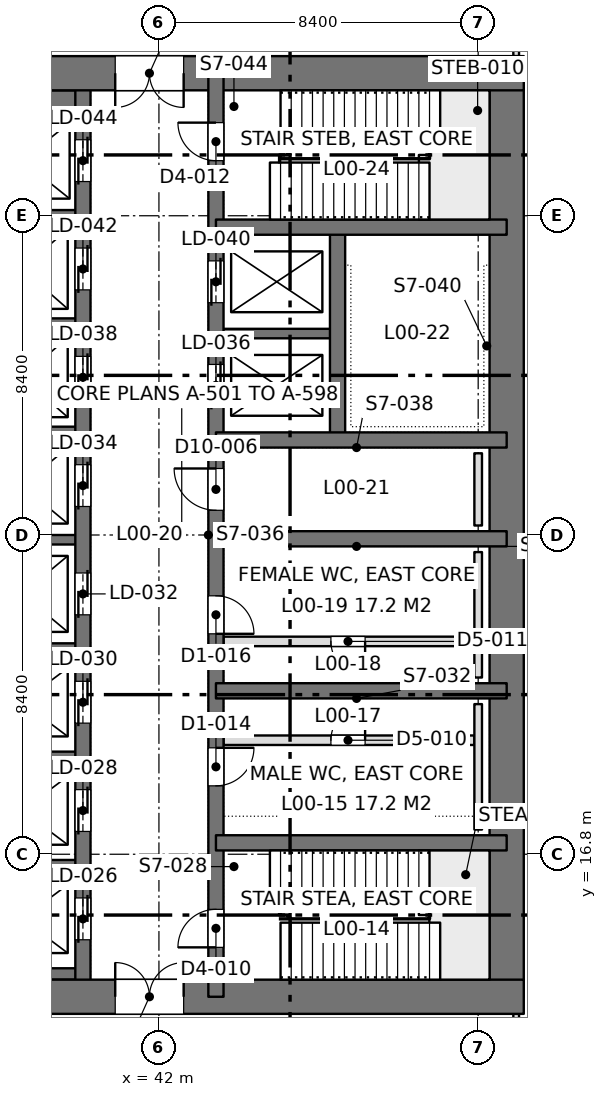
"""IFC4 building model, lengths in metres.
Left out: names, types, materials, properties, quantities, classifications, styles, units other than length and angle.
Written with IfcOpenShell. Run it as: python <this file> out.ifc"""

import sys

from ifc_helpers import new_model, si_unit, direction, frame, frame_2d, origin, place, context, subcontext, project, spatial, rectangle, extrude, element, fill, save


model = new_model("IFC4")
c1 = context("Model", 3, precision=1e-05, world=origin(), true_north=direction((0.0, 1.0)))
c2 = subcontext(c1, "Body", "Model", "MODEL_VIEW")
j1 = project(units=[si_unit("LENGTHUNIT", "METRE"), si_unit("PLANEANGLEUNIT", "RADIAN")], contexts=[c1])
p1 = place(None, origin())
s1 = spatial("IfcSite", under=j1, at=p1, CompositionType="ELEMENT")
p2 = place(p1, origin())
s2 = spatial("IfcBuilding", under=s1, at=p2, CompositionType="ELEMENT")
p3 = place(p2, origin())
s3 = spatial("IfcBuildingStorey", under=s2, at=p3, CompositionType="ELEMENT", Elevation=0.0)
p4 = place(p3, frame((33.6, 13.05, 0.0), z_axis=(0.0, 0.0, 1.0), x_axis=(1.0, 0.0, 0.0)))
e1 = element("IfcWall", 1, at=p4, inside=s3, PredefinedType="SHEAR", context=c2, shape_type="SweptSolid", body=[
    extrude(rectangle(XDim=18.0, YDim=0.9, at=frame_2d((9.0, 0.0))), origin(), (0.0, 0.0, 1.0), 5.4),
])
p5 = place(p4, frame((7.25, 0.0, 0.0)))
e2 = element("IfcOpeningElement", 2, at=p5, cuts=e1, PredefinedType="OPENING", context=c2, shape_type="SweptSolid", body=[
    extrude(rectangle(XDim=1.8, YDim=2.4, at=frame_2d((0.9, 1.2))), frame((0.0, 0.46, 0.0), z_axis=(0.0, -1.0, 0.0), x_axis=(1.0, 0.0, 0.0)), (0.0, 0.0, 1.0), 0.92),
])
p6 = place(p3, frame((33.6, 37.35, 0.0), z_axis=(0.0, 0.0, 1.0), x_axis=(1.0, 0.0, 0.0)))
e3 = element("IfcWall", 3, at=p6, inside=s3, PredefinedType="SHEAR", context=c2, shape_type="SweptSolid", body=[
    extrude(rectangle(XDim=18.0, YDim=0.9, at=frame_2d((9.0, 0.0))), origin(), (0.0, 0.0, 1.0), 5.4),
])
p7 = place(p6, frame((7.25, 0.0, 0.0)))
e4 = element("IfcOpeningElement", 4, at=p7, cuts=e3, PredefinedType="OPENING", context=c2, shape_type="SweptSolid", body=[
    extrude(rectangle(XDim=1.8, YDim=2.4, at=frame_2d((0.9, 1.2))), frame((0.0, 0.46, 0.0), z_axis=(0.0, -1.0, 0.0), x_axis=(1.0, 0.0, 0.0)), (0.0, 0.0, 1.0), 0.92),
])
p8 = place(p3, frame((51.15, 13.05, 0.0), z_axis=(0.0, 0.0, 1.0), x_axis=(0.0, 1.0, 0.0)))
e5 = element("IfcWall", 5, at=p8, inside=s3, PredefinedType="SHEAR", context=c2, shape_type="SweptSolid", body=[
    extrude(rectangle(XDim=24.3, YDim=0.9, at=frame_2d((12.15, 0.0))), origin(), (0.0, 0.0, 1.0), 5.4),
])
p9 = place(p3, frame((43.5, 13.05, 0.0), z_axis=(0.0, 0.0, 1.0), x_axis=(0.0, 1.0, 0.0)))
e6 = element("IfcWall", 6, at=p9, inside=s3, PredefinedType="SHEAR", context=c2, shape_type="SweptSolid", body=[
    extrude(rectangle(XDim=24.3, YDim=0.4, at=frame_2d((12.15, 0.0))), origin(), (0.0, 0.0, 1.0), 5.4),
])
p10 = place(p9, frame((1.3, 0.0, 0.0)))
e7 = element("IfcOpeningElement", 7, at=p10, cuts=e6, PredefinedType="OPENING", context=c2, shape_type="SweptSolid", body=[
    extrude(rectangle(XDim=1.0, YDim=2.2, at=frame_2d((0.5, 1.1))), frame((0.0, 0.21, 0.0), z_axis=(0.0, -1.0, 0.0), x_axis=(1.0, 0.0, 0.0)), (0.0, 0.0, 1.0), 0.42),
])
p11 = place(p9, frame((22.0, 0.0, 0.0)))
e8 = element("IfcOpeningElement", 8, at=p11, cuts=e6, PredefinedType="OPENING", context=c2, shape_type="SweptSolid", body=[
    extrude(rectangle(XDim=1.0, YDim=2.2, at=frame_2d((0.5, 1.1))), frame((0.0, 0.21, 0.0), z_axis=(0.0, -1.0, 0.0), x_axis=(1.0, 0.0, 0.0)), (0.0, 0.0, 1.0), 0.42),
])
p12 = place(p9, frame((5.55, 0.0, 0.0)))
e9 = element("IfcOpeningElement", 9, at=p12, cuts=e6, PredefinedType="OPENING", context=c2, shape_type="SweptSolid", body=[
    extrude(rectangle(XDim=1.0, YDim=2.2, at=frame_2d((0.5, 1.1))), frame((0.0, 0.21, 0.0), z_axis=(0.0, -1.0, 0.0), x_axis=(1.0, 0.0, 0.0)), (0.0, 0.0, 1.0), 0.42),
])
p13 = place(p9, frame((9.55, 0.0, 0.0)))
e10 = element("IfcOpeningElement", 10, at=p13, cuts=e6, PredefinedType="OPENING", context=c2, shape_type="SweptSolid", body=[
    extrude(rectangle(XDim=1.0, YDim=2.2, at=frame_2d((0.5, 1.1))), frame((0.0, 0.21, 0.0), z_axis=(0.0, -1.0, 0.0), x_axis=(1.0, 0.0, 0.0)), (0.0, 0.0, 1.0), 0.42),
])
p14 = place(p9, frame((12.8, 0.0, 0.0)))
e11 = element("IfcOpeningElement", 11, at=p14, cuts=e6, PredefinedType="OPENING", context=c2, shape_type="SweptSolid", body=[
    extrude(rectangle(XDim=1.1, YDim=2.2, at=frame_2d((0.55, 1.1))), frame((0.0, 0.21, 0.0), z_axis=(0.0, -1.0, 0.0), x_axis=(1.0, 0.0, 0.0)), (0.0, 0.0, 1.0), 0.42),
])
p15 = place(p9, frame((15.538, 0.0, 0.0)))
e12 = element("IfcOpeningElement", 12, at=p15, cuts=e6, PredefinedType="OPENING", context=c2, shape_type="SweptSolid", body=[
    extrude(rectangle(XDim=1.1, YDim=2.2, at=frame_2d((0.55, 1.1))), frame((0.0, 0.21, 0.0), z_axis=(0.0, -1.0, 0.0), x_axis=(1.0, 0.0, 0.0)), (0.0, 0.0, 1.0), 0.42),
])
p16 = place(p9, frame((18.262, 0.0, 0.0)))
e13 = element("IfcOpeningElement", 13, at=p16, cuts=e6, PredefinedType="OPENING", context=c2, shape_type="SweptSolid", body=[
    extrude(rectangle(XDim=1.1, YDim=2.2, at=frame_2d((0.55, 1.1))), frame((0.0, 0.21, 0.0), z_axis=(0.0, -1.0, 0.0), x_axis=(1.0, 0.0, 0.0)), (0.0, 0.0, 1.0), 0.42),
])
p17 = place(p3, frame((40.0, 13.05, 0.0), z_axis=(0.0, 0.0, 1.0), x_axis=(0.0, 1.0, 0.0)))
e14 = element("IfcWall", 14, at=p17, inside=s3, PredefinedType="SHEAR", context=c2, shape_type="SweptSolid", body=[
    extrude(rectangle(XDim=24.3, YDim=0.4, at=frame_2d((12.15, 0.0))), origin(), (0.0, 0.0, 1.0), 5.4),
])
p18 = place(p17, frame((1.5, 0.0, 0.0)))
e15 = element("IfcOpeningElement", 15, at=p18, cuts=e14, PredefinedType="OPENING", context=c2, shape_type="SweptSolid", body=[
    extrude(rectangle(XDim=1.1, YDim=2.2, at=frame_2d((0.55, 1.1))), frame((0.0, 0.21, 0.0), z_axis=(0.0, -1.0, 0.0), x_axis=(1.0, 0.0, 0.0)), (0.0, 0.0, 1.0), 0.42),
])
p19 = place(p17, frame((4.35, 0.0, 0.0)))
e16 = element("IfcOpeningElement", 16, at=p19, cuts=e14, PredefinedType="OPENING", context=c2, shape_type="SweptSolid", body=[
    extrude(rectangle(XDim=1.1, YDim=2.2, at=frame_2d((0.55, 1.1))), frame((0.0, 0.21, 0.0), z_axis=(0.0, -1.0, 0.0), x_axis=(1.0, 0.0, 0.0)), (0.0, 0.0, 1.0), 0.42),
])
p20 = place(p17, frame((7.2, 0.0, 0.0)))
e17 = element("IfcOpeningElement", 17, at=p20, cuts=e14, PredefinedType="OPENING", context=c2, shape_type="SweptSolid", body=[
    extrude(rectangle(XDim=1.1, YDim=2.2, at=frame_2d((0.55, 1.1))), frame((0.0, 0.21, 0.0), z_axis=(0.0, -1.0, 0.0), x_axis=(1.0, 0.0, 0.0)), (0.0, 0.0, 1.0), 0.42),
])
p21 = place(p17, frame((10.05, 0.0, 0.0)))
e18 = element("IfcOpeningElement", 18, at=p21, cuts=e14, PredefinedType="OPENING", context=c2, shape_type="SweptSolid", body=[
    extrude(rectangle(XDim=1.1, YDim=2.2, at=frame_2d((0.55, 1.1))), frame((0.0, 0.21, 0.0), z_axis=(0.0, -1.0, 0.0), x_axis=(1.0, 0.0, 0.0)), (0.0, 0.0, 1.0), 0.42),
])
p22 = place(p17, frame((12.9, 0.0, 0.0)))
e19 = element("IfcOpeningElement", 19, at=p22, cuts=e14, PredefinedType="OPENING", context=c2, shape_type="SweptSolid", body=[
    extrude(rectangle(XDim=1.1, YDim=2.2, at=frame_2d((0.55, 1.1))), frame((0.0, 0.21, 0.0), z_axis=(0.0, -1.0, 0.0), x_axis=(1.0, 0.0, 0.0)), (0.0, 0.0, 1.0), 0.42),
])
p23 = place(p17, frame((15.75, 0.0, 0.0)))
e20 = element("IfcOpeningElement", 20, at=p23, cuts=e14, PredefinedType="OPENING", context=c2, shape_type="SweptSolid", body=[
    extrude(rectangle(XDim=1.1, YDim=2.2, at=frame_2d((0.55, 1.1))), frame((0.0, 0.21, 0.0), z_axis=(0.0, -1.0, 0.0), x_axis=(1.0, 0.0, 0.0)), (0.0, 0.0, 1.0), 0.42),
])
p24 = place(p17, frame((18.6, 0.0, 0.0)))
e21 = element("IfcOpeningElement", 21, at=p24, cuts=e14, PredefinedType="OPENING", context=c2, shape_type="SweptSolid", body=[
    extrude(rectangle(XDim=1.1, YDim=2.2, at=frame_2d((0.55, 1.1))), frame((0.0, 0.21, 0.0), z_axis=(0.0, -1.0, 0.0), x_axis=(1.0, 0.0, 0.0)), (0.0, 0.0, 1.0), 0.42),
])
p25 = place(p17, frame((21.45, 0.0, 0.0)))
e22 = element("IfcOpeningElement", 22, at=p25, cuts=e14, PredefinedType="OPENING", context=c2, shape_type="SweptSolid", body=[
    extrude(rectangle(XDim=1.1, YDim=2.2, at=frame_2d((0.55, 1.1))), frame((0.0, 0.21, 0.0), z_axis=(0.0, -1.0, 0.0), x_axis=(1.0, 0.0, 0.0)), (0.0, 0.0, 1.0), 0.42),
])
for number, where, z_axis, x_axis in (
    (23, (51.15, 17.1, 0.0), (0.0, 0.0, 1.0), (-1.0, 0.0, 0.0)),
    (24, (51.15, 21.1, 0.0), (0.0, 0.0, 1.0), (-1.0, 0.0, 0.0)),
    (25, (51.15, 25.1, 0.0), (0.0, 0.0, 1.0), (-1.0, 0.0, 0.0)),
    (26, (51.15, 27.7, 0.0), (0.0, 0.0, 1.0), (-1.0, 0.0, 0.0)),
    (27, (51.15, 33.3, 0.0), (0.0, 0.0, 1.0), (-1.0, 0.0, 0.0)),
):
    element("IfcWall", number, at=place(p3, frame(where, z_axis=z_axis, x_axis=x_axis)), inside=s3, PredefinedType="SHEAR", context=c2, shape_type="SweptSolid", body=[
        extrude(rectangle(XDim=7.65, YDim=0.4, at=frame_2d((3.825, 0.0))), origin(), (0.0, 0.0, 1.0), 5.4),
    ])
p26 = place(p3, frame((46.7, 27.7, 0.0), z_axis=(0.0, 0.0, 1.0), x_axis=(0.0, 1.0, 0.0)))
e28 = element("IfcWall", 28, at=p26, inside=s3, PredefinedType="SHEAR", context=c2, shape_type="SweptSolid", body=[
    extrude(rectangle(XDim=5.6, YDim=0.4, at=frame_2d((2.8, 0.0))), origin(), (0.0, 0.0, 1.0), 5.4),
])
p27 = place(p3, frame((46.7, 30.5, 0.0), z_axis=(0.0, 0.0, 1.0), x_axis=(-1.0, 0.0, 0.0)))
e29 = element("IfcWall", 29, at=p27, inside=s3, PredefinedType="SHEAR", context=c2, shape_type="SweptSolid", body=[
    extrude(rectangle(XDim=3.2, YDim=0.25, at=frame_2d((1.6, 0.0))), origin(), (0.0, 0.0, 1.0), 5.4),
])
p28 = place(p3, frame((40.0, 13.65, 0.0), z_axis=(0.0, 0.0, 1.0), x_axis=(-1.0, 0.0, 0.0)))
e30 = element("IfcWall", 30, at=p28, inside=s3, PredefinedType="SHEAR", context=c2, shape_type="SweptSolid", body=[
    extrude(rectangle(XDim=3.2, YDim=0.3, at=frame_2d((1.6, 0.0))), origin(), (0.0, 0.0, 1.0), 5.4),
])
for number, where, z_axis, x_axis in (
    (31, (40.0, 16.525, 0.0), (0.0, 0.0, 1.0), (-1.0, 0.0, 0.0)),
    (32, (40.0, 19.375, 0.0), (0.0, 0.0, 1.0), (-1.0, 0.0, 0.0)),
    (33, (40.0, 22.225, 0.0), (0.0, 0.0, 1.0), (-1.0, 0.0, 0.0)),
    (34, (40.0, 25.075, 0.0), (0.0, 0.0, 1.0), (-1.0, 0.0, 0.0)),
    (35, (40.0, 27.925, 0.0), (0.0, 0.0, 1.0), (-1.0, 0.0, 0.0)),
    (36, (40.0, 30.775, 0.0), (0.0, 0.0, 1.0), (-1.0, 0.0, 0.0)),
    (37, (40.0, 33.625, 0.0), (0.0, 0.0, 1.0), (-1.0, 0.0, 0.0)),
):
    element("IfcWall", number, at=place(p3, frame(where, z_axis=z_axis, x_axis=x_axis)), inside=s3, PredefinedType="SHEAR", context=c2, shape_type="SweptSolid", body=[
        extrude(rectangle(XDim=3.2, YDim=0.25, at=frame_2d((1.6, 0.0))), origin(), (0.0, 0.0, 1.0), 5.4),
    ])
p29 = place(p3, frame((40.0, 36.625, 0.0), z_axis=(0.0, 0.0, 1.0), x_axis=(-1.0, 0.0, 0.0)))
e38 = element("IfcWall", 38, at=p29, inside=s3, PredefinedType="SHEAR", context=c2, shape_type="SweptSolid", body=[
    extrude(rectangle(XDim=3.2, YDim=0.55, at=frame_2d((1.6, 0.0))), origin(), (0.0, 0.0, 1.0), 5.4),
])
p30 = place(p3, frame((51.4, 6.12, 0.0), z_axis=(0.0, 0.0, 1.0), x_axis=(0.0, 1.0, 0.0)))
e39 = element("IfcWall", 39, at=p30, inside=s3, PredefinedType="PARTITIONING", context=c2, shape_type="SweptSolid", body=[
    extrude(rectangle(XDim=6.482, YDim=0.15, at=frame_2d((3.241, 0.0))), origin(), (0.0, 0.0, 1.0), 4.6),
])
p31 = place(p30, frame((3.88, 0.0, 0.0)))
e40 = element("IfcOpeningElement", 40, at=p31, cuts=e39, PredefinedType="OPENING", context=c2, shape_type="SweptSolid", body=[
    extrude(rectangle(XDim=1.0, YDim=2.2, at=frame_2d((0.5, 1.1))), frame((0.0, 0.085, 0.0), z_axis=(0.0, -1.0, 0.0), x_axis=(1.0, 0.0, 0.0)), (0.0, 0.0, 1.0), 0.17),
])
p32 = place(p3, frame((51.4, 37.8, 0.0), z_axis=(0.0, 0.0, 1.0), x_axis=(0.0, 1.0, 0.0)))
e41 = element("IfcWall", 41, at=p32, inside=s3, PredefinedType="PARTITIONING", context=c2, shape_type="SweptSolid", body=[
    extrude(rectangle(XDim=13.526, YDim=0.15, at=frame_2d((6.763, 0.0))), origin(), (0.0, 0.0, 1.0), 4.6),
])
p33 = place(p32, frame((7.9, 0.0, 0.0)))
e42 = element("IfcOpeningElement", 42, at=p33, cuts=e41, PredefinedType="OPENING", context=c2, shape_type="SweptSolid", body=[
    extrude(rectangle(XDim=1.0, YDim=2.2, at=frame_2d((0.5, 1.1))), frame((0.0, 0.085, 0.0), z_axis=(0.0, -1.0, 0.0), x_axis=(1.0, 0.0, 0.0)), (0.0, 0.0, 1.0), 0.17),
])
p34 = place(p3, frame((43.7, 22.4, 0.0), z_axis=(0.0, 0.0, 1.0), x_axis=(1.0, 0.0, 0.0)))
e43 = element("IfcWall", 43, at=p34, inside=s3, PredefinedType="PARTITIONING", context=c2, shape_type="SweptSolid", body=[
    extrude(rectangle(XDim=6.6, YDim=0.25, at=frame_2d((3.3, 0.0))), origin(), (0.0, 0.0, 1.0), 5.2),
])
p35 = place(p34, frame((2.825, 0.0, 0.0)))
e44 = element("IfcOpeningElement", 44, at=p35, cuts=e43, PredefinedType="OPENING", context=c2, shape_type="SweptSolid", body=[
    extrude(rectangle(XDim=0.9, YDim=2.2, at=frame_2d((0.45, 1.1))), frame((0.0, 0.135, 0.0), z_axis=(0.0, -1.0, 0.0), x_axis=(1.0, 0.0, 0.0)), (0.0, 0.0, 1.0), 0.27),
])
p36 = place(p3, frame((43.7, 19.8, 0.0), z_axis=(0.0, 0.0, 1.0), x_axis=(1.0, 0.0, 0.0)))
e45 = element("IfcWall", 45, at=p36, inside=s3, PredefinedType="PARTITIONING", context=c2, shape_type="SweptSolid", body=[
    extrude(rectangle(XDim=6.6, YDim=0.25, at=frame_2d((3.3, 0.0))), origin(), (0.0, 0.0, 1.0), 5.2),
])
p37 = place(p36, frame((2.825, 0.0, 0.0)))
e46 = element("IfcOpeningElement", 46, at=p37, cuts=e45, PredefinedType="OPENING", context=c2, shape_type="SweptSolid", body=[
    extrude(rectangle(XDim=0.9, YDim=2.2, at=frame_2d((0.45, 1.1))), frame((0.0, 0.135, 0.0), z_axis=(0.0, -1.0, 0.0), x_axis=(1.0, 0.0, 0.0)), (0.0, 0.0, 1.0), 0.27),
])
for number, where, z_axis, x_axis in (
    (47, (50.4, 17.45, 0.0), (0.0, 0.0, 1.0), (0.0, 1.0, 0.0)),
    (48, (50.4, 21.45, 0.0), (0.0, 0.0, 1.0), (0.0, 1.0, 0.0)),
):
    element("IfcWall", number, at=place(p3, frame(where, z_axis=z_axis, x_axis=x_axis)), inside=s3, PredefinedType="PLUMBINGWALL", context=c2, shape_type="SweptSolid", body=[
        extrude(rectangle(XDim=3.3, YDim=0.2, at=frame_2d((1.65, 0.0))), origin(), (0.0, 0.0, 1.0), 1.2),
    ])
p38 = place(p3, frame((50.4, 25.45, 0.0), z_axis=(0.0, 0.0, 1.0), x_axis=(0.0, 1.0, 0.0)))
e49 = element("IfcWall", 49, at=p38, inside=s3, PredefinedType="PLUMBINGWALL", context=c2, shape_type="SweptSolid", body=[
    extrude(rectangle(XDim=1.9, YDim=0.2, at=frame_2d((0.95, 0.0))), origin(), (0.0, 0.0, 1.0), 1.2),
])
p39 = place(p5, origin())
e50 = element("IfcDoor", 50, at=p39, inside=s3, OperationType="DOUBLE_DOOR_SINGLE_SWING", PredefinedType="DOOR", context=c2, shape_type="SweptSolid", body=[
    extrude(rectangle(XDim=1.8, YDim=2.4, at=frame_2d((0.9, 1.2))), frame((0.0, 0.025, 0.0), z_axis=(0.0, -1.0, 0.0), x_axis=(1.0, 0.0, 0.0)), (0.0, 0.0, 1.0), 0.05),
])
fill(e2, e50)
p40 = place(p7, frame((1.8, 0.0, 0.0), z_axis=(0.0, 0.0, 1.0), x_axis=(-1.0, 0.0, 0.0)))
e51 = element("IfcDoor", 51, at=p40, inside=s3, OperationType="DOUBLE_DOOR_SINGLE_SWING", PredefinedType="DOOR", context=c2, shape_type="SweptSolid", body=[
    extrude(rectangle(XDim=1.8, YDim=2.4, at=frame_2d((0.9, 1.2))), frame((0.0, 0.025, 0.0), z_axis=(0.0, -1.0, 0.0), x_axis=(1.0, 0.0, 0.0)), (0.0, 0.0, 1.0), 0.05),
])
fill(e4, e51)
p41 = place(p10, origin())
e52 = element("IfcDoor", 52, at=p41, inside=s3, OperationType="SINGLE_SWING_LEFT", PredefinedType="DOOR", context=c2, shape_type="SweptSolid", body=[
    extrude(rectangle(XDim=1.0, YDim=2.2, at=frame_2d((0.5, 1.1))), frame((0.0, 0.025, 0.0), z_axis=(0.0, -1.0, 0.0), x_axis=(1.0, 0.0, 0.0)), (0.0, 0.0, 1.0), 0.05),
])
fill(e7, e52)
p42 = place(p11, origin())
e53 = element("IfcDoor", 53, at=p42, inside=s3, OperationType="SINGLE_SWING_RIGHT", PredefinedType="DOOR", context=c2, shape_type="SweptSolid", body=[
    extrude(rectangle(XDim=1.0, YDim=2.2, at=frame_2d((0.5, 1.1))), frame((0.0, 0.025, 0.0), z_axis=(0.0, -1.0, 0.0), x_axis=(1.0, 0.0, 0.0)), (0.0, 0.0, 1.0), 0.05),
])
fill(e8, e53)
p43 = place(p12, frame((1.0, 0.0, 0.0), z_axis=(0.0, 0.0, 1.0), x_axis=(-1.0, 0.0, 0.0)))
e54 = element("IfcDoor", 54, at=p43, inside=s3, OperationType="SINGLE_SWING_LEFT", PredefinedType="DOOR", context=c2, shape_type="SweptSolid", body=[
    extrude(rectangle(XDim=1.0, YDim=2.2, at=frame_2d((0.5, 1.1))), frame((0.0, 0.025, 0.0), z_axis=(0.0, -1.0, 0.0), x_axis=(1.0, 0.0, 0.0)), (0.0, 0.0, 1.0), 0.05),
])
fill(e9, e54)
p44 = place(p13, frame((1.0, 0.0, 0.0), z_axis=(0.0, 0.0, 1.0), x_axis=(-1.0, 0.0, 0.0)))
e55 = element("IfcDoor", 55, at=p44, inside=s3, OperationType="SINGLE_SWING_RIGHT", PredefinedType="DOOR", context=c2, shape_type="SweptSolid", body=[
    extrude(rectangle(XDim=1.0, YDim=2.2, at=frame_2d((0.5, 1.1))), frame((0.0, 0.025, 0.0), z_axis=(0.0, -1.0, 0.0), x_axis=(1.0, 0.0, 0.0)), (0.0, 0.0, 1.0), 0.05),
])
fill(e10, e55)
p45 = place(p14, origin())
e56 = element("IfcDoor", 56, at=p45, inside=s3, OperationType="SINGLE_SWING_RIGHT", PredefinedType="DOOR", context=c2, shape_type="SweptSolid", body=[
    extrude(rectangle(XDim=1.1, YDim=2.2, at=frame_2d((0.55, 1.1))), frame((0.0, 0.025, 0.0), z_axis=(0.0, -1.0, 0.0), x_axis=(1.0, 0.0, 0.0)), (0.0, 0.0, 1.0), 0.05),
])
fill(e11, e56)
p46 = place(p18, origin())
e57 = element("IfcDoor", 57, at=p46, inside=s3, OperationType="DOUBLE_DOOR_SLIDING", PredefinedType="DOOR", context=c2, shape_type="SweptSolid", body=[
    extrude(rectangle(XDim=1.1, YDim=2.2, at=frame_2d((0.55, 1.1))), frame((0.0, 0.025, 0.0), z_axis=(0.0, -1.0, 0.0), x_axis=(1.0, 0.0, 0.0)), (0.0, 0.0, 1.0), 0.05),
])
fill(e15, e57)
p47 = place(p19, origin())
e58 = element("IfcDoor", 58, at=p47, inside=s3, OperationType="DOUBLE_DOOR_SLIDING", PredefinedType="DOOR", context=c2, shape_type="SweptSolid", body=[
    extrude(rectangle(XDim=1.1, YDim=2.2, at=frame_2d((0.55, 1.1))), frame((0.0, 0.025, 0.0), z_axis=(0.0, -1.0, 0.0), x_axis=(1.0, 0.0, 0.0)), (0.0, 0.0, 1.0), 0.05),
])
fill(e16, e58)
p48 = place(p20, origin())
e59 = element("IfcDoor", 59, at=p48, inside=s3, OperationType="DOUBLE_DOOR_SLIDING", PredefinedType="DOOR", context=c2, shape_type="SweptSolid", body=[
    extrude(rectangle(XDim=1.1, YDim=2.2, at=frame_2d((0.55, 1.1))), frame((0.0, 0.025, 0.0), z_axis=(0.0, -1.0, 0.0), x_axis=(1.0, 0.0, 0.0)), (0.0, 0.0, 1.0), 0.05),
])
fill(e17, e59)
p49 = place(p21, origin())
e60 = element("IfcDoor", 60, at=p49, inside=s3, OperationType="DOUBLE_DOOR_SLIDING", PredefinedType="DOOR", context=c2, shape_type="SweptSolid", body=[
    extrude(rectangle(XDim=1.1, YDim=2.2, at=frame_2d((0.55, 1.1))), frame((0.0, 0.025, 0.0), z_axis=(0.0, -1.0, 0.0), x_axis=(1.0, 0.0, 0.0)), (0.0, 0.0, 1.0), 0.05),
])
fill(e18, e60)
p50 = place(p22, origin())
e61 = element("IfcDoor", 61, at=p50, inside=s3, OperationType="DOUBLE_DOOR_SLIDING", PredefinedType="DOOR", context=c2, shape_type="SweptSolid", body=[
    extrude(rectangle(XDim=1.1, YDim=2.2, at=frame_2d((0.55, 1.1))), frame((0.0, 0.025, 0.0), z_axis=(0.0, -1.0, 0.0), x_axis=(1.0, 0.0, 0.0)), (0.0, 0.0, 1.0), 0.05),
])
fill(e19, e61)
p51 = place(p23, origin())
e62 = element("IfcDoor", 62, at=p51, inside=s3, OperationType="DOUBLE_DOOR_SLIDING", PredefinedType="DOOR", context=c2, shape_type="SweptSolid", body=[
    extrude(rectangle(XDim=1.1, YDim=2.2, at=frame_2d((0.55, 1.1))), frame((0.0, 0.025, 0.0), z_axis=(0.0, -1.0, 0.0), x_axis=(1.0, 0.0, 0.0)), (0.0, 0.0, 1.0), 0.05),
])
fill(e20, e62)
p52 = place(p24, origin())
e63 = element("IfcDoor", 63, at=p52, inside=s3, OperationType="DOUBLE_DOOR_SLIDING", PredefinedType="DOOR", context=c2, shape_type="SweptSolid", body=[
    extrude(rectangle(XDim=1.1, YDim=2.2, at=frame_2d((0.55, 1.1))), frame((0.0, 0.025, 0.0), z_axis=(0.0, -1.0, 0.0), x_axis=(1.0, 0.0, 0.0)), (0.0, 0.0, 1.0), 0.05),
])
fill(e21, e63)
p53 = place(p25, origin())
e64 = element("IfcDoor", 64, at=p53, inside=s3, OperationType="DOUBLE_DOOR_SLIDING", PredefinedType="DOOR", context=c2, shape_type="SweptSolid", body=[
    extrude(rectangle(XDim=1.1, YDim=2.2, at=frame_2d((0.55, 1.1))), frame((0.0, 0.025, 0.0), z_axis=(0.0, -1.0, 0.0), x_axis=(1.0, 0.0, 0.0)), (0.0, 0.0, 1.0), 0.05),
])
fill(e22, e64)
p54 = place(p15, origin())
e65 = element("IfcDoor", 65, at=p54, inside=s3, OperationType="DOUBLE_DOOR_SLIDING", PredefinedType="DOOR", context=c2, shape_type="SweptSolid", body=[
    extrude(rectangle(XDim=1.1, YDim=2.2, at=frame_2d((0.55, 1.1))), frame((0.0, 0.025, 0.0), z_axis=(0.0, -1.0, 0.0), x_axis=(1.0, 0.0, 0.0)), (0.0, 0.0, 1.0), 0.05),
])
fill(e12, e65)
p55 = place(p16, origin())
e66 = element("IfcDoor", 66, at=p55, inside=s3, OperationType="DOUBLE_DOOR_SLIDING", PredefinedType="DOOR", context=c2, shape_type="SweptSolid", body=[
    extrude(rectangle(XDim=1.1, YDim=2.2, at=frame_2d((0.55, 1.1))), frame((0.0, 0.025, 0.0), z_axis=(0.0, -1.0, 0.0), x_axis=(1.0, 0.0, 0.0)), (0.0, 0.0, 1.0), 0.05),
])
fill(e13, e66)
p56 = place(p35, frame((0.9, 0.0, 0.0), z_axis=(0.0, 0.0, 1.0), x_axis=(-1.0, 0.0, 0.0)))
e67 = element("IfcDoor", 67, at=p56, inside=s3, OperationType="SINGLE_SWING_LEFT", PredefinedType="DOOR", context=c2, shape_type="SweptSolid", body=[
    extrude(rectangle(XDim=0.9, YDim=2.2, at=frame_2d((0.45, 1.1))), frame((0.0, 0.025, 0.0), z_axis=(0.0, -1.0, 0.0), x_axis=(1.0, 0.0, 0.0)), (0.0, 0.0, 1.0), 0.05),
])
fill(e44, e67)
p57 = place(p37, origin())
e68 = element("IfcDoor", 68, at=p57, inside=s3, OperationType="SINGLE_SWING_RIGHT", PredefinedType="DOOR", context=c2, shape_type="SweptSolid", body=[
    extrude(rectangle(XDim=0.9, YDim=2.2, at=frame_2d((0.45, 1.1))), frame((0.0, 0.025, 0.0), z_axis=(0.0, -1.0, 0.0), x_axis=(1.0, 0.0, 0.0)), (0.0, 0.0, 1.0), 0.05),
])
fill(e46, e68)
save(model, sys.argv[1])
